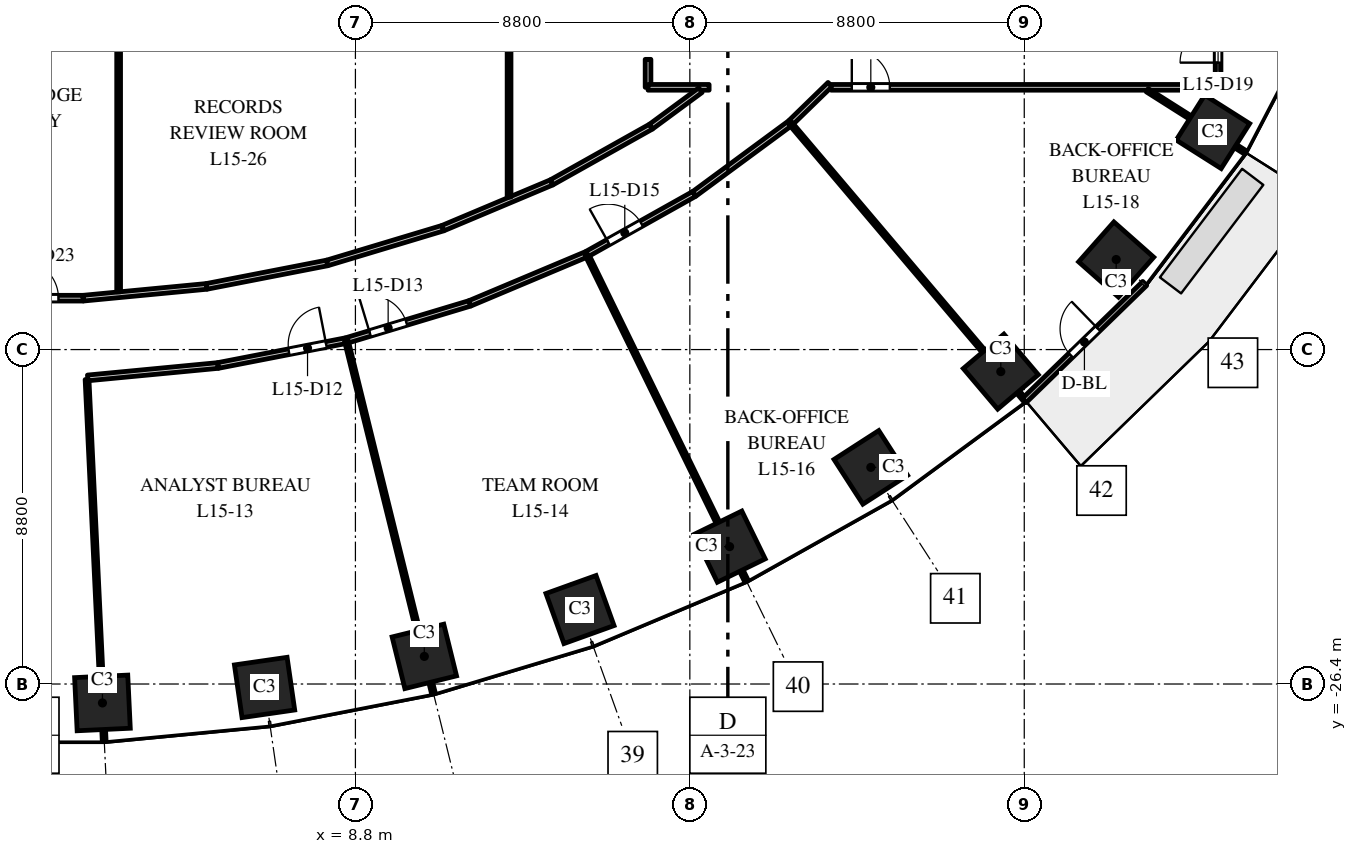
"""IFC4 building model, lengths in metres.
Left out: names, types, materials, properties, quantities, classifications, styles, units other than length and angle.
Written with IfcOpenShell. Run it as: python <this file> out.ifc"""

import sys

from ifc_helpers import new_model, si_unit, direction, frame, frame_2d, origin, origin_2d, place, context, subcontext, project, spatial, rectangle, extrude, element, fill, save


model = new_model("IFC4")
c1 = context("Model", 3, precision=1e-05, world=origin(), true_north=direction((0.0, 1.0)))
c2 = subcontext(c1, "Body", "Model", "MODEL_VIEW")
j1 = project(units=[si_unit("LENGTHUNIT", "METRE"), si_unit("PLANEANGLEUNIT", "RADIAN")], contexts=[c1])
p1 = place(None, origin())
s1 = spatial("IfcSite", under=j1, at=p1, CompositionType="ELEMENT")
p2 = place(p1, origin())
s2 = spatial("IfcBuilding", under=s1, at=p2, CompositionType="ELEMENT")
p3 = place(p2, frame((0.0, 0.0, 70.5)))
s3 = spatial("IfcBuildingStorey", under=s2, at=p3, CompositionType="ELEMENT", Elevation=70.5)
for number, where, z_axis, x_axis in (
    (1, (2.143, -26.898, 0.0), (0.0, 0.0, 1.0), (0.999, 0.048, 0.0)),
    (2, (6.409, -26.491, 0.0), (0.0, 0.0, 1.0), (0.99, 0.143, 0.0)),
    (3, (10.613, -25.674, 0.0), (0.0, 0.0, 1.0), (0.971, 0.24, 0.0)),
    (4, (14.709, -24.441, 0.0), (0.0, 0.0, 1.0), (0.941, 0.338, 0.0)),
    (5, (18.646, -22.785, 0.0), (0.0, 0.0, 1.0), (0.898, 0.439, 0.0)),
    (6, (22.362, -20.7, 0.0), (0.0, 0.0, 1.0), (0.84, 0.542, 0.0)),
    (7, (25.783, -18.18, 0.0), (0.0, 0.0, 1.0), (0.763, 0.646, 0.0)),
    (8, (28.819, -15.23, 0.0), (0.0, 0.0, 1.0), (0.663, 0.749, 0.0)),
    (9, (31.365, -11.871, 0.0), (0.0, 0.0, 1.0), (0.535, 0.845, 0.0)),
):
    element("IfcColumn", number, at=place(p3, frame(where, z_axis=z_axis, x_axis=x_axis)), inside=s3, PredefinedType="COLUMN", context=c2, shape_type="SweptSolid", body=[
        extrude(rectangle(XDim=1.4, YDim=1.4, at=origin_2d()), origin(), (0.0, 0.0, 1.0), 4.0),
    ])
p4 = place(p3, frame((26.396, -18.943, 0.0), z_axis=(0.0, 0.0, 1.0), x_axis=(0.717214761864, 0.696852197647, 0.0)))
e10 = element("IfcWall", 10, at=p4, inside=s3, PredefinedType="STANDARD", context=c2, shape_type="SweptSolid", body=[
    extrude(rectangle(XDim=4.424, YDim=0.15, at=frame_2d((2.212, 0.0))), origin(), (0.0, 0.0, 1.0), 3.7),
])
p5 = place(p4, frame((1.712, 0.0, 0.0)))
e11 = element("IfcOpeningElement", 11, at=p5, cuts=e10, PredefinedType="OPENING", context=c2, shape_type="SweptSolid", body=[
    extrude(rectangle(XDim=1.0, YDim=2.4, at=frame_2d((0.5, 1.2))), frame((0.0, 0.085, 0.0), z_axis=(0.0, -1.0, 0.0), x_axis=(1.0, 0.0, 0.0)), (0.0, 0.0, 1.0), 0.17),
])
p6 = place(p3, frame((-1.636, -16.248, 0.0), z_axis=(0.0, 0.0, 1.0), x_axis=(1.0, 0.0, 0.0)))
e12 = element("IfcWall", 12, at=p6, inside=s3, PredefinedType="PARTITIONING", context=c2, shape_type="SweptSolid", body=[
    extrude(rectangle(XDim=3.272, YDim=0.15, at=frame_2d((1.636, 0.0))), origin(), (0.0, 0.0, 1.0), 2.85),
])
p7 = place(p6, frame((1.622, 0.0, 0.0)))
e13 = element("IfcOpeningElement", 13, at=p7, cuts=e12, PredefinedType="OPENING", context=c2, shape_type="SweptSolid", body=[
    extrude(rectangle(XDim=1.0, YDim=2.1, at=frame_2d((0.5, 1.05))), frame((0.0, 0.085, 0.0), z_axis=(0.0, -1.0, 0.0), x_axis=(1.0, 0.0, 0.0)), (0.0, 0.0, 1.0), 0.17),
])
p8 = place(p3, frame((1.636, -16.248, 0.0), z_axis=(0.0, 0.0, 1.0), x_axis=(0.99547459835, 0.095028017131, 0.0)))
e14 = element("IfcWall", 14, at=p8, inside=s3, PredefinedType="PARTITIONING", context=c2, shape_type="SweptSolid", body=[
    extrude(rectangle(XDim=3.263, YDim=0.15, at=frame_2d((1.631, 0.0))), origin(), (0.0, 0.0, 1.0), 2.85),
])
p9 = place(p3, frame((1.738, -18.387, 0.0), z_axis=(0.0, 0.0, 1.0), x_axis=(0.047358051836, -0.998877977996, 0.0)))
e15 = element("IfcWall", 15, at=p9, inside=s3, PredefinedType="PARTITIONING", context=c2, shape_type="SweptSolid", body=[
    extrude(rectangle(XDim=9.522, YDim=0.1, at=frame_2d((4.761, 0.0))), origin(), (0.0, 0.0, 1.0), 2.85),
])
p10 = place(p3, frame((1.756, -18.346, 0.0), z_axis=(0.0, 0.0, 1.0), x_axis=(0.99548367506, 0.094932885187, 0.0)))
e16 = element("IfcWall", 16, at=p10, inside=s3, PredefinedType="PARTITIONING", context=c2, shape_type="SweptSolid", body=[
    extrude(rectangle(XDim=3.444, YDim=0.15, at=frame_2d((1.722, 0.0))), origin(), (0.0, 0.0, 1.0), 2.85),
])
p11 = place(p3, frame((2.569, -16.08, 0.0), z_axis=(0.0, 0.0, 1.0), x_axis=(0.0, 1.0, 0.0)))
e17 = element("IfcWall", 17, at=p11, inside=s3, PredefinedType="PARTITIONING", context=c2, shape_type="SweptSolid", body=[
    extrude(rectangle(XDim=8.919, YDim=0.1, at=frame_2d((4.459, 0.0))), origin(), (0.0, 0.0, 1.0), 2.85),
])
p12 = place(p3, frame((4.884, -15.938, 0.0), z_axis=(0.0, 0.0, 1.0), x_axis=(0.981604377859, 0.190926282547, 0.0)))
e18 = element("IfcWall", 18, at=p12, inside=s3, PredefinedType="PARTITIONING", context=c2, shape_type="SweptSolid", body=[
    extrude(rectangle(XDim=3.231, YDim=0.15, at=frame_2d((1.616, 0.0))), origin(), (0.0, 0.0, 1.0), 3.7),
])
p13 = place(p3, frame((5.184, -18.019, 0.0), z_axis=(0.0, 0.0, 1.0), x_axis=(0.981650299947, 0.190690032812, 0.0)))
e19 = element("IfcWall", 19, at=p13, inside=s3, PredefinedType="PARTITIONING", context=c2, shape_type="SweptSolid", body=[
    extrude(rectangle(XDim=3.42, YDim=0.15, at=frame_2d((1.71, 0.0))), origin(), (0.0, 0.0, 1.0), 3.7),
])
p14 = place(p13, frame((1.9, 0.0, 0.0)))
e20 = element("IfcOpeningElement", 20, at=p14, cuts=e19, PredefinedType="OPENING", context=c2, shape_type="SweptSolid", body=[
    extrude(rectangle(XDim=1.0, YDim=2.1, at=frame_2d((0.5, 1.05))), frame((0.0, 0.085, 0.0), z_axis=(0.0, -1.0, 0.0), x_axis=(1.0, 0.0, 0.0)), (0.0, 0.0, 1.0), 0.17),
])
p15 = place(p3, frame((8.056, -15.321, 0.0), z_axis=(0.0, 0.0, 1.0), x_axis=(0.957612601062, 0.28805920622, 0.0)))
e21 = element("IfcWall", 21, at=p15, inside=s3, PredefinedType="PARTITIONING", context=c2, shape_type="SweptSolid", body=[
    extrude(rectangle(XDim=3.18, YDim=0.15, at=frame_2d((1.59, 0.0))), origin(), (0.0, 0.0, 1.0), 2.85),
])
p16 = place(p3, frame((8.56, -17.363, 0.0), z_axis=(0.0, 0.0, 1.0), x_axis=(0.95754884035, 0.28827108482, 0.0)))
e22 = element("IfcWall", 22, at=p16, inside=s3, PredefinedType="PARTITIONING", context=c2, shape_type="SweptSolid", body=[
    extrude(rectangle(XDim=3.396, YDim=0.15, at=frame_2d((1.698, 0.0))), origin(), (0.0, 0.0, 1.0), 2.85),
])
p17 = place(p16, frame((0.65, 0.0, 0.0)))
e23 = element("IfcOpeningElement", 23, at=p17, cuts=e22, PredefinedType="OPENING", context=c2, shape_type="SweptSolid", body=[
    extrude(rectangle(XDim=1.0, YDim=2.1, at=frame_2d((0.5, 1.05))), frame((0.0, 0.085, 0.0), z_axis=(0.0, -1.0, 0.0), x_axis=(1.0, 0.0, 0.0)), (0.0, 0.0, 1.0), 0.17),
])
p18 = place(p3, frame((8.561, -17.367, 0.0), z_axis=(0.0, 0.0, 1.0), x_axis=(0.239800031194, -0.970822303534, 0.0)))
e24 = element("IfcWall", 24, at=p18, inside=s3, PredefinedType="PARTITIONING", context=c2, shape_type="SweptSolid", body=[
    extrude(rectangle(XDim=9.558, YDim=0.1, at=frame_2d((4.779, 0.0))), origin(), (0.0, 0.0, 1.0), 2.85),
])
p19 = place(p3, frame((11.101, -14.405, 0.0), z_axis=(0.0, 0.0, 1.0), x_axis=(0.921753827375, 0.387775555857, 0.0)))
e25 = element("IfcWall", 25, at=p19, inside=s3, PredefinedType="PARTITIONING", context=c2, shape_type="SweptSolid", body=[
    extrude(rectangle(XDim=3.103, YDim=0.15, at=frame_2d((1.551, 0.0))), origin(), (0.0, 0.0, 1.0), 3.7),
])
p20 = place(p3, frame((11.812, -16.384, 0.0), z_axis=(0.0, 0.0, 1.0), x_axis=(0.921839278558, 0.387572373252, 0.0)))
e26 = element("IfcWall", 26, at=p20, inside=s3, PredefinedType="PARTITIONING", context=c2, shape_type="SweptSolid", body=[
    extrude(rectangle(XDim=3.333, YDim=0.15, at=frame_2d((1.667, 0.0))), origin(), (0.0, 0.0, 1.0), 3.7),
])
p21 = place(p3, frame((12.843, -13.587, 0.0), z_axis=(0.0, 0.0, 1.0), x_axis=(0.0, 1.0, 0.0)))
e27 = element("IfcWall", 27, at=p21, inside=s3, PredefinedType="PARTITIONING", context=c2, shape_type="SweptSolid", body=[
    extrude(rectangle(XDim=27.174, YDim=0.1, at=frame_2d((13.587, 0.0))), origin(), (0.0, 0.0, 1.0), 2.75),
])
p22 = place(p3, frame((13.961, -13.202, 0.0), z_axis=(0.0, 0.0, 1.0), x_axis=(0.872164226045, 0.489213207924, 0.0)))
e28 = element("IfcWall", 28, at=p22, inside=s3, PredefinedType="PARTITIONING", context=c2, shape_type="SweptSolid", body=[
    extrude(rectangle(XDim=2.998, YDim=0.15, at=frame_2d((1.499, 0.0))), origin(), (0.0, 0.0, 1.0), 3.7),
])
p23 = place(p3, frame((14.887, -15.096, 0.0), z_axis=(0.0, 0.0, 1.0), x_axis=(0.439197765869, -0.89839040648, 0.0)))
e29 = element("IfcWall", 29, at=p23, inside=s3, PredefinedType="PARTITIONING", context=c2, shape_type="SweptSolid", body=[
    extrude(rectangle(XDim=9.561, YDim=0.1, at=frame_2d((4.78, 0.0))), origin(), (0.0, 0.0, 1.0), 2.85),
])
p24 = place(p3, frame((14.902, -15.082, 0.0), z_axis=(0.0, 0.0, 1.0), x_axis=(0.872144615544, 0.489248167679, 0.0)))
e30 = element("IfcWall", 30, at=p24, inside=s3, PredefinedType="PARTITIONING", context=c2, shape_type="SweptSolid", body=[
    extrude(rectangle(XDim=3.228, YDim=0.15, at=frame_2d((1.614, 0.0))), origin(), (0.0, 0.0, 1.0), 3.7),
])
p25 = place(p24, frame((0.63, 0.0, 0.0)))
e31 = element("IfcOpeningElement", 31, at=p25, cuts=e30, PredefinedType="OPENING", context=c2, shape_type="SweptSolid", body=[
    extrude(rectangle(XDim=1.0, YDim=2.1, at=frame_2d((0.5, 1.05))), frame((0.0, 0.085, 0.0), z_axis=(0.0, -1.0, 0.0), x_axis=(1.0, 0.0, 0.0)), (0.0, 0.0, 1.0), 0.17),
])
p26 = place(p3, frame((16.5, -10.7, 0.0), z_axis=(0.0, 0.0, 1.0), x_axis=(0.0, 1.0, 0.0)))
e32 = element("IfcWall", 32, at=p26, inside=s3, PredefinedType="PARTITIONING", context=c2, shape_type="SweptSolid", body=[
    extrude(rectangle(XDim=0.736, YDim=0.15, at=frame_2d((0.368, 0.0))), origin(), (0.0, 0.0, 1.0), 3.7),
])
p27 = place(p3, frame((16.5, -10.7, 0.0), z_axis=(0.0, 0.0, 1.0), x_axis=(1.0, 0.0, 0.0)))
e33 = element("IfcWall", 33, at=p27, inside=s3, PredefinedType="PARTITIONING", context=c2, shape_type="SweptSolid", body=[
    extrude(rectangle(XDim=1.607, YDim=0.15, at=frame_2d((0.803, 0.0))), origin(), (0.0, 0.0, 1.0), 3.7),
])
p28 = place(p3, frame((16.576, -11.735, 0.0), z_axis=(0.0, 0.0, 1.0), x_axis=(0.805021714708, 0.593245344566, 0.0)))
e34 = element("IfcWall", 34, at=p28, inside=s3, PredefinedType="PARTITIONING", context=c2, shape_type="SweptSolid", body=[
    extrude(rectangle(XDim=1.619, YDim=0.15, at=frame_2d((0.809, 0.0))), origin(), (0.0, 0.0, 1.0), 3.7),
])
p29 = place(p3, frame((17.717, -13.503, 0.0), z_axis=(0.0, 0.0, 1.0), x_axis=(0.805106688633, 0.593130019404, 0.0)))
e35 = element("IfcWall", 35, at=p29, inside=s3, PredefinedType="PARTITIONING", context=c2, shape_type="SweptSolid", body=[
    extrude(rectangle(XDim=3.137, YDim=0.15, at=frame_2d((1.569, 0.0))), origin(), (0.0, 0.0, 1.0), 3.7),
])
p30 = place(p3, frame((20.245, -11.645, 0.0), z_axis=(0.0, 0.0, 1.0), x_axis=(0.646420249139, -0.762981560395, 0.0)))
e36 = element("IfcWall", 36, at=p30, inside=s3, PredefinedType="PARTITIONING", context=c2, shape_type="SweptSolid", body=[
    extrude(rectangle(XDim=9.568, YDim=0.1, at=frame_2d((4.784, 0.0))), origin(), (0.0, 0.0, 1.0), 2.85),
])
p31 = place(p3, frame((20.257, -11.628, 0.0), z_axis=(0.0, 0.0, 1.0), x_axis=(0.717129161976, 0.696940288005, 0.0)))
e37 = element("IfcWall", 37, at=p31, inside=s3, PredefinedType="PARTITIONING", context=c2, shape_type="SweptSolid", body=[
    extrude(rectangle(XDim=1.439, YDim=0.15, at=frame_2d((0.719, 0.0))), origin(), (0.0, 0.0, 1.0), 2.75),
])
p32 = place(p3, frame((21.32, -10.7, 0.0), z_axis=(0.0, 0.0, 1.0), x_axis=(1.0, 0.0, 0.0)))
e38 = element("IfcWall", 38, at=p32, inside=s3, PredefinedType="PARTITIONING", context=c2, shape_type="SweptSolid", body=[
    extrude(rectangle(XDim=10.18, YDim=0.15, at=frame_2d((5.09, 0.0))), origin(), (0.0, 0.0, 1.0), 2.85),
])
p33 = place(p32, frame((0.542, 0.0, 0.0)))
e39 = element("IfcOpeningElement", 39, at=p33, cuts=e38, PredefinedType="OPENING", context=c2, shape_type="SweptSolid", body=[
    extrude(rectangle(XDim=1.0, YDim=2.1, at=frame_2d((0.5, 1.05))), frame((0.0, 0.085, 0.0), z_axis=(0.0, -1.0, 0.0), x_axis=(1.0, 0.0, 0.0)), (0.0, 0.0, 1.0), 0.17),
])
p34 = place(p3, frame((29.637, -10.777, 0.0), z_axis=(0.0, 0.0, 1.0), x_axis=(0.844810627195, -0.535065420467, 0.0)))
e40 = element("IfcWall", 40, at=p34, inside=s3, PredefinedType="PARTITIONING", context=c2, shape_type="SweptSolid", body=[
    extrude(rectangle(XDim=3.048, YDim=0.1, at=frame_2d((1.524, 0.0))), origin(), (0.0, 0.0, 1.0), 2.85),
])
p35 = place(p3, frame((31.5, -10.7, 0.0), z_axis=(0.0, 0.0, 1.0), x_axis=(0.0, 1.0, 0.0)))
e41 = element("IfcWall", 41, at=p35, inside=s3, PredefinedType="PARTITIONING", context=c2, shape_type="SweptSolid", body=[
    extrude(rectangle(XDim=2.2, YDim=0.15, at=frame_2d((1.1, 0.0))), origin(), (0.0, 0.0, 1.0), 2.85),
])
p36 = place(p35, frame((0.65, 0.0, 0.0)))
e42 = element("IfcOpeningElement", 42, at=p36, cuts=e41, PredefinedType="OPENING", context=c2, shape_type="SweptSolid", body=[
    extrude(rectangle(XDim=1.0, YDim=2.1, at=frame_2d((0.5, 1.05))), frame((0.0, 0.085, 0.0), z_axis=(0.0, -1.0, 0.0), x_axis=(1.0, 0.0, 0.0)), (0.0, 0.0, 1.0), 0.17),
])
p37 = place(p5, origin())
e43 = element("IfcDoor", 43, at=p37, inside=s3, OperationType="SINGLE_SWING_RIGHT", PredefinedType="DOOR", context=c2, shape_type="SweptSolid", body=[
    extrude(rectangle(XDim=1.0, YDim=2.4, at=frame_2d((0.5, 1.2))), frame((0.0, 0.025, 0.0), z_axis=(0.0, -1.0, 0.0), x_axis=(1.0, 0.0, 0.0)), (0.0, 0.0, 1.0), 0.05),
])
fill(e11, e43)
p38 = place(p14, origin())
e44 = element("IfcDoor", 44, at=p38, inside=s3, OperationType="SINGLE_SWING_RIGHT", PredefinedType="DOOR", context=c2, shape_type="SweptSolid", body=[
    extrude(rectangle(XDim=1.0, YDim=2.1, at=frame_2d((0.5, 1.05))), frame((0.0, 0.025, 0.0), z_axis=(0.0, -1.0, 0.0), x_axis=(1.0, 0.0, 0.0)), (0.0, 0.0, 1.0), 0.05),
])
fill(e20, e44)
p39 = place(p17, origin())
e45 = element("IfcDoor", 45, at=p39, inside=s3, OperationType="SINGLE_SWING_LEFT", PredefinedType="DOOR", context=c2, shape_type="SweptSolid", body=[
    extrude(rectangle(XDim=1.0, YDim=2.1, at=frame_2d((0.5, 1.05))), frame((0.0, 0.025, 0.0), z_axis=(0.0, -1.0, 0.0), x_axis=(1.0, 0.0, 0.0)), (0.0, 0.0, 1.0), 0.05),
])
fill(e23, e45)
p40 = place(p25, origin())
e46 = element("IfcDoor", 46, at=p40, inside=s3, OperationType="SINGLE_SWING_LEFT", PredefinedType="DOOR", context=c2, shape_type="SweptSolid", body=[
    extrude(rectangle(XDim=1.0, YDim=2.1, at=frame_2d((0.5, 1.05))), frame((0.0, 0.025, 0.0), z_axis=(0.0, -1.0, 0.0), x_axis=(1.0, 0.0, 0.0)), (0.0, 0.0, 1.0), 0.05),
])
fill(e31, e46)
p41 = place(p33, origin())
e47 = element("IfcDoor", 47, at=p41, inside=s3, OperationType="SINGLE_SWING_LEFT", PredefinedType="DOOR", context=c2, shape_type="SweptSolid", body=[
    extrude(rectangle(XDim=1.0, YDim=2.1, at=frame_2d((0.5, 1.05))), frame((0.0, 0.025, 0.0), z_axis=(0.0, -1.0, 0.0), x_axis=(1.0, 0.0, 0.0)), (0.0, 0.0, 1.0), 0.05),
])
fill(e39, e47)
p42 = place(p36, origin())
e48 = element("IfcDoor", 48, at=p42, inside=s3, OperationType="SINGLE_SWING_LEFT", PredefinedType="DOOR", context=c2, shape_type="SweptSolid", body=[
    extrude(rectangle(XDim=1.0, YDim=2.1, at=frame_2d((0.5, 1.05))), frame((0.0, 0.025, 0.0), z_axis=(0.0, -1.0, 0.0), x_axis=(1.0, 0.0, 0.0)), (0.0, 0.0, 1.0), 0.05),
])
fill(e42, e48)
p43 = place(p7, origin())
e49 = element("IfcDoor", 49, at=p43, inside=s3, OperationType="SINGLE_SWING_LEFT", PredefinedType="DOOR", context=c2, shape_type="SweptSolid", body=[
    extrude(rectangle(XDim=1.0, YDim=2.1, at=frame_2d((0.5, 1.05))), frame((0.0, 0.025, 0.0), z_axis=(0.0, -1.0, 0.0), x_axis=(1.0, 0.0, 0.0)), (0.0, 0.0, 1.0), 0.05),
])
fill(e13, e49)
save(model, sys.argv[1])
